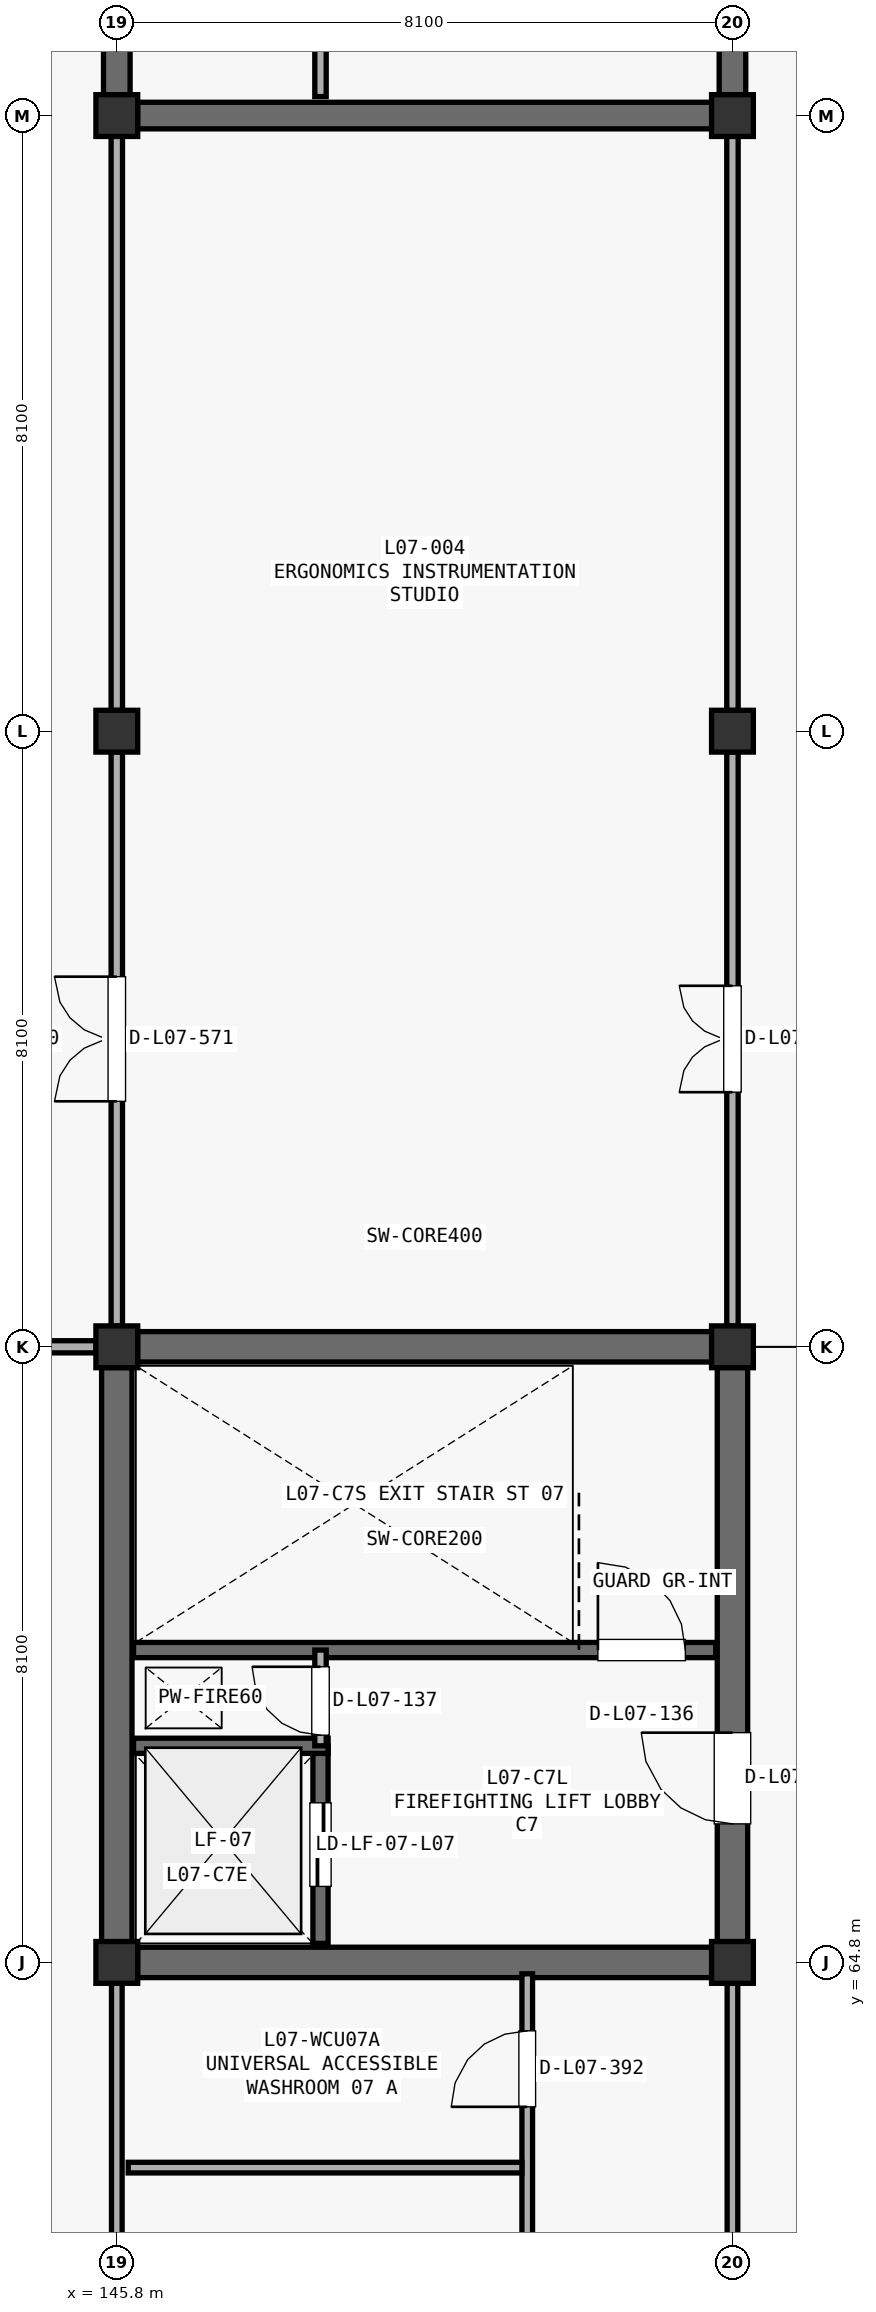
"""IFC4 building model, lengths in metres.
Left out: names, types, materials, properties, quantities, classifications, styles, units other than length and angle.
Written with IfcOpenShell. Run it as: python <this file> out.ifc"""

import sys

from ifc_helpers import new_model, si_unit, direction, frame, frame_2d, origin, origin_2d, place, context, subcontext, project, spatial, rectangle, extrude, element, fill, save


model = new_model("IFC4")
c1 = context("Model", 3, precision=1e-05, world=origin(), true_north=direction((0.0, 1.0)))
c2 = subcontext(c1, "Body", "Model", "MODEL_VIEW")
j1 = project(units=[si_unit("LENGTHUNIT", "METRE"), si_unit("PLANEANGLEUNIT", "RADIAN")], contexts=[c1])
p1 = place(None, origin())
s1 = spatial("IfcSite", under=j1, at=p1, CompositionType="ELEMENT")
p2 = place(p1, origin())
s2 = spatial("IfcBuilding", under=s1, at=p2, CompositionType="ELEMENT")
p3 = place(p2, frame((0.0, 0.0, 31.79)))
s3 = spatial("IfcBuildingStorey", under=s2, at=p3, CompositionType="ELEMENT", Elevation=31.79)
for number, where, z_axis, x_axis in (
    (1, (145.8, 64.8, 0.0), (0.0, 0.0, 1.0), (1.0, 0.0, 0.0)),
    (2, (145.8, 72.9, 0.0), (0.0, 0.0, 1.0), (1.0, 0.0, 0.0)),
    (3, (145.8, 81.0, 0.0), (0.0, 0.0, 1.0), (1.0, 0.0, 0.0)),
    (4, (145.8, 89.1, 0.0), (0.0, 0.0, 1.0), (1.0, 0.0, 0.0)),
    (5, (153.9, 64.8, 0.0), (0.0, 0.0, 1.0), (1.0, 0.0, 0.0)),
    (6, (153.9, 72.9, 0.0), (0.0, 0.0, 1.0), (1.0, 0.0, 0.0)),
    (7, (153.9, 81.0, 0.0), (0.0, 0.0, 1.0), (1.0, 0.0, 0.0)),
    (8, (153.9, 89.1, 0.0), (0.0, 0.0, 1.0), (1.0, 0.0, 0.0)),
):
    element("IfcColumn", number, at=place(p3, frame(where, z_axis=z_axis, x_axis=x_axis)), inside=s3, PredefinedType="COLUMN", context=c2, shape_type="SweptSolid", body=[
        extrude(rectangle(XDim=0.55, YDim=0.55, at=origin_2d()), origin(), (0.0, 0.0, 1.0), 4.42),
    ])
for number, where, z_axis, x_axis in (
    (9, (146.073, 72.9, 0.0), (0.0, 0.0, 1.0), (1.0, 0.0, 0.0)),
    (10, (145.8, 65.073, 0.0), (0.0, 0.0, 1.0), (0.0, 1.0, 0.0)),
):
    element("IfcWall", number, at=place(p3, frame(where, z_axis=z_axis, x_axis=x_axis)), inside=s3, PredefinedType="SHEAR", context=c2, shape_type="SweptSolid", body=[
        extrude(rectangle(XDim=7.554, YDim=0.4, at=frame_2d((3.777, 0.0))), origin(), (0.0, 0.0, 1.0), 4.162),
    ])
p4 = place(p3, frame((153.9, 65.073, 0.0), z_axis=(0.0, 0.0, 1.0), x_axis=(0.0, 1.0, 0.0)))
e11 = element("IfcWall", 11, at=p4, inside=s3, PredefinedType="SHEAR", context=c2, shape_type="SweptSolid", body=[
    extrude(rectangle(XDim=7.554, YDim=0.4, at=frame_2d((3.777, 0.0))), origin(), (0.0, 0.0, 1.0), 4.162),
])
p5 = place(p4, frame((1.55, 0.0, 0.0)))
e12 = element("IfcOpeningElement", 12, at=p5, cuts=e11, PredefinedType="OPENING", context=c2, shape_type="SweptSolid", body=[
    extrude(rectangle(XDim=1.2, YDim=2.2, at=frame_2d((0.6, 1.1))), frame((0.0, 0.21, 0.0), z_axis=(0.0, -1.0, 0.0), x_axis=(1.0, 0.0, 0.0)), (0.0, 0.0, 1.0), 0.42),
])
p6 = place(p3, frame((146.073, 64.8, 0.0), z_axis=(0.0, 0.0, 1.0), x_axis=(1.0, 0.0, 0.0)))
e13 = element("IfcWall", 13, at=p6, inside=s3, PredefinedType="SHEAR", context=c2, shape_type="SweptSolid", body=[
    extrude(rectangle(XDim=7.554, YDim=0.4, at=frame_2d((3.777, 0.0))), origin(), (0.0, 0.0, 1.0), 4.162),
])
p7 = place(p3, frame((146.02, 68.91, 0.0), z_axis=(0.0, 0.0, 1.0), x_axis=(1.0, 0.0, 0.0)))
e14 = element("IfcWall", 14, at=p7, inside=s3, PredefinedType="SHEAR", context=c2, shape_type="SweptSolid", body=[
    extrude(rectangle(XDim=7.66, YDim=0.2, at=frame_2d((3.83, 0.0))), origin(), (0.0, 0.0, 1.0), 4.162),
])
p8 = place(p7, frame((6.11, 0.0, 0.0)))
e15 = element("IfcOpeningElement", 15, at=p8, cuts=e14, PredefinedType="OPENING", context=c2, shape_type="SweptSolid", body=[
    extrude(rectangle(XDim=1.15, YDim=2.2, at=frame_2d((0.575, 1.1))), frame((0.0, 0.11, 0.0), z_axis=(0.0, -1.0, 0.0), x_axis=(1.0, 0.0, 0.0)), (0.0, 0.0, 1.0), 0.22),
])
p9 = place(p3, frame((148.48, 65.05, 0.0), z_axis=(0.0, 0.0, 1.0), x_axis=(0.0, 1.0, 0.0)))
e16 = element("IfcWall", 16, at=p9, inside=s3, PredefinedType="SHEAR", context=c2, shape_type="SweptSolid", body=[
    extrude(rectangle(XDim=2.6, YDim=0.2, at=frame_2d((1.3, 0.0))), origin(), (0.0, 0.0, 1.0), 4.162),
])
p10 = place(p9, frame((0.75, 0.0, 0.0)))
e17 = element("IfcOpeningElement", 17, at=p10, cuts=e16, PredefinedType="OPENING", context=c2, shape_type="SweptSolid", body=[
    extrude(rectangle(XDim=1.1, YDim=2.2, at=frame_2d((0.55, 1.1))), frame((0.0, 0.11, 0.0), z_axis=(0.0, -1.0, 0.0), x_axis=(1.0, 0.0, 0.0)), (0.0, 0.0, 1.0), 0.22),
])
p11 = place(p3, frame((146.02, 67.65, 0.0), z_axis=(0.0, 0.0, 1.0), x_axis=(1.0, 0.0, 0.0)))
e18 = element("IfcWall", 18, at=p11, inside=s3, PredefinedType="SHEAR", context=c2, shape_type="SweptSolid", body=[
    extrude(rectangle(XDim=2.56, YDim=0.2, at=frame_2d((1.28, 0.0))), origin(), (0.0, 0.0, 1.0), 4.162),
])
p12 = place(p3, frame((148.48, 67.65, 0.0), z_axis=(0.0, 0.0, 1.0), x_axis=(0.0, 1.0, 0.0)))
e19 = element("IfcWall", 19, at=p12, inside=s3, PredefinedType="PARTITIONING", context=c2, shape_type="SweptSolid", body=[
    extrude(rectangle(XDim=1.26, YDim=0.15, at=frame_2d((0.63, 0.0))), origin(), (0.0, 0.0, 1.0), 4.162),
])
p13 = place(p12, frame((0.14, 0.0, 0.0)))
e20 = element("IfcOpeningElement", 20, at=p13, cuts=e19, PredefinedType="OPENING", context=c2, shape_type="SweptSolid", body=[
    extrude(rectangle(XDim=0.9, YDim=2.15, at=frame_2d((0.45, 1.075))), frame((0.0, 0.085, 0.0), z_axis=(0.0, -1.0, 0.0), x_axis=(1.0, 0.0, 0.0)), (0.0, 0.0, 1.0), 0.17),
])
p14 = place(p3, frame((145.8, 89.373, 0.0), z_axis=(0.0, 0.0, 1.0), x_axis=(0.0, 1.0, 0.0)))
e21 = element("IfcWall", 21, at=p14, inside=s3, PredefinedType="SHEAR", context=c2, shape_type="SweptSolid", body=[
    extrude(rectangle(XDim=7.554, YDim=0.35, at=frame_2d((3.777, 0.0))), origin(), (0.0, 0.0, 1.0), 4.162),
])
p15 = place(p3, frame((153.9, 89.373, 0.0), z_axis=(0.0, 0.0, 1.0), x_axis=(0.0, 1.0, 0.0)))
e22 = element("IfcWall", 22, at=p15, inside=s3, PredefinedType="SHEAR", context=c2, shape_type="SweptSolid", body=[
    extrude(rectangle(XDim=7.554, YDim=0.35, at=frame_2d((3.777, 0.0))), origin(), (0.0, 0.0, 1.0), 4.162),
])
p16 = place(p15, frame((1.55, 0.0, 0.0)))
e23 = element("IfcOpeningElement", 23, at=p16, cuts=e22, PredefinedType="OPENING", context=c2, shape_type="SweptSolid", body=[
    extrude(rectangle(XDim=1.2, YDim=2.2, at=frame_2d((0.6, 1.1))), frame((0.0, 0.185, 0.0), z_axis=(0.0, -1.0, 0.0), x_axis=(1.0, 0.0, 0.0)), (0.0, 0.0, 1.0), 0.37),
])
p17 = place(p3, frame((146.073, 89.1, 0.0), z_axis=(0.0, 0.0, 1.0), x_axis=(1.0, 0.0, 0.0)))
e24 = element("IfcWall", 24, at=p17, inside=s3, PredefinedType="SHEAR", context=c2, shape_type="SweptSolid", body=[
    extrude(rectangle(XDim=7.554, YDim=0.35, at=frame_2d((3.777, 0.0))), origin(), (0.0, 0.0, 1.0), 4.162),
])
p18 = place(p3, frame((148.48, 89.35, 0.0), z_axis=(0.0, 0.0, 1.0), x_axis=(0.0, 1.0, 0.0)))
e25 = element("IfcWall", 25, at=p18, inside=s3, PredefinedType="PARTITIONING", context=c2, shape_type="SweptSolid", body=[
    extrude(rectangle(XDim=2.6, YDim=0.15, at=frame_2d((1.3, 0.0))), origin(), (0.0, 0.0, 1.0), 4.162),
])
p19 = place(p18, frame((0.8, 0.0, 0.0)))
e26 = element("IfcOpeningElement", 26, at=p19, cuts=e25, PredefinedType="OPENING", context=c2, shape_type="SweptSolid", body=[
    extrude(rectangle(XDim=0.95, YDim=2.15, at=frame_2d((0.475, 1.075))), frame((0.0, 0.085, 0.0), z_axis=(0.0, -1.0, 0.0), x_axis=(1.0, 0.0, 0.0)), (0.0, 0.0, 1.0), 0.17),
])
p20 = place(p3, frame((145.8, 56.973, 0.0), z_axis=(0.0, 0.0, 1.0), x_axis=(0.0, 1.0, 0.0)))
e27 = element("IfcWall", 27, at=p20, inside=s3, PredefinedType="PARTITIONING", context=c2, shape_type="SweptSolid", body=[
    extrude(rectangle(XDim=7.554, YDim=0.14, at=frame_2d((3.777, 0.0))), origin(), (0.0, 0.0, 1.0), 3.51),
])
p21 = place(p3, frame((153.9, 56.973, 0.0), z_axis=(0.0, 0.0, 1.0), x_axis=(0.0, 1.0, 0.0)))
e28 = element("IfcWall", 28, at=p21, inside=s3, PredefinedType="PARTITIONING", context=c2, shape_type="SweptSolid", body=[
    extrude(rectangle(XDim=7.554, YDim=0.14, at=frame_2d((3.777, 0.0))), origin(), (0.0, 0.0, 1.0), 3.31),
])
p22 = place(p21, frame((3.317, 0.0, 0.0)))
e29 = element("IfcOpeningElement", 29, at=p22, cuts=e28, PredefinedType="OPENING", context=c2, shape_type="SweptSolid", body=[
    extrude(rectangle(XDim=0.92, YDim=2.15, at=frame_2d((0.46, 1.075))), frame((0.0, 0.08, 0.0), z_axis=(0.0, -1.0, 0.0), x_axis=(1.0, 0.0, 0.0)), (0.0, 0.0, 1.0), 0.16),
])
p23 = place(p3, frame((151.2, 56.85, 0.0), z_axis=(0.0, 0.0, 1.0), x_axis=(0.0, 1.0, 0.0)))
e30 = element("IfcWall", 30, at=p23, inside=s3, PredefinedType="PARTITIONING", context=c2, shape_type="SweptSolid", body=[
    extrude(rectangle(XDim=7.8, YDim=0.14, at=frame_2d((3.9, 0.0))), origin(), (0.0, 0.0, 1.0), 4.162),
])
p24 = place(p23, frame((0.75, 0.0, 0.0)))
e31 = element("IfcOpeningElement", 31, at=p24, cuts=e30, PredefinedType="OPENING", context=c2, shape_type="SweptSolid", body=[
    extrude(rectangle(XDim=0.92, YDim=2.15, at=frame_2d((0.46, 1.075))), frame((0.0, 0.08, 0.0), z_axis=(0.0, -1.0, 0.0), x_axis=(1.0, 0.0, 0.0)), (0.0, 0.0, 1.0), 0.16),
])
p25 = place(p23, frame((3.44, 0.0, 0.0)))
e32 = element("IfcOpeningElement", 32, at=p25, cuts=e30, PredefinedType="OPENING", context=c2, shape_type="SweptSolid", body=[
    extrude(rectangle(XDim=0.92, YDim=2.15, at=frame_2d((0.46, 1.075))), frame((0.0, 0.08, 0.0), z_axis=(0.0, -1.0, 0.0), x_axis=(1.0, 0.0, 0.0)), (0.0, 0.0, 1.0), 0.16),
])
p26 = place(p23, frame((6.05, 0.0, 0.0)))
e33 = element("IfcOpeningElement", 33, at=p26, cuts=e30, PredefinedType="OPENING", context=c2, shape_type="SweptSolid", body=[
    extrude(rectangle(XDim=1.0, YDim=2.15, at=frame_2d((0.5, 1.075))), frame((0.0, 0.08, 0.0), z_axis=(0.0, -1.0, 0.0), x_axis=(1.0, 0.0, 0.0)), (0.0, 0.0, 1.0), 0.16),
])
p27 = place(p3, frame((145.95, 62.1, 0.0), z_axis=(0.0, 0.0, 1.0), x_axis=(1.0, 0.0, 0.0)))
e34 = element("IfcWall", 34, at=p27, inside=s3, PredefinedType="PARTITIONING", context=c2, shape_type="SweptSolid", body=[
    extrude(rectangle(XDim=5.18, YDim=0.14, at=frame_2d((2.59, 0.0))), origin(), (0.0, 0.0, 1.0), 4.162),
])
p28 = place(p3, frame((137.973, 72.9, 0.0), z_axis=(0.0, 0.0, 1.0), x_axis=(1.0, 0.0, 0.0)))
e35 = element("IfcWall", 35, at=p28, inside=s3, PredefinedType="PARTITIONING", context=c2, shape_type="SweptSolid", body=[
    extrude(rectangle(XDim=7.554, YDim=0.16, at=frame_2d((3.777, 0.0))), origin(), (0.0, 0.0, 1.0), 3.212),
])
p29 = place(p3, frame((145.8, 73.173, 0.0), z_axis=(0.0, 0.0, 1.0), x_axis=(0.0, 1.0, 0.0)))
e36 = element("IfcWall", 36, at=p29, inside=s3, PredefinedType="PARTITIONING", context=c2, shape_type="SweptSolid", body=[
    extrude(rectangle(XDim=7.554, YDim=0.15, at=frame_2d((3.777, 0.0))), origin(), (0.0, 0.0, 1.0), 3.312),
])
p30 = place(p29, frame((2.957, 0.0, 0.0)))
e37 = element("IfcOpeningElement", 37, at=p30, cuts=e36, PredefinedType="OPENING", context=c2, shape_type="SweptSolid", body=[
    extrude(rectangle(XDim=1.64, YDim=2.25, at=frame_2d((0.82, 1.125))), frame((0.0, 0.085, 0.0), z_axis=(0.0, -1.0, 0.0), x_axis=(1.0, 0.0, 0.0)), (0.0, 0.0, 1.0), 0.17),
])
p31 = place(p3, frame((145.8, 81.273, 0.0), z_axis=(0.0, 0.0, 1.0), x_axis=(0.0, 1.0, 0.0)))
e38 = element("IfcWall", 38, at=p31, inside=s3, PredefinedType="PARTITIONING", context=c2, shape_type="SweptSolid", body=[
    extrude(rectangle(XDim=7.554, YDim=0.15, at=frame_2d((3.777, 0.0))), origin(), (0.0, 0.0, 1.0), 3.212),
])
p32 = place(p3, frame((153.9, 73.173, 0.0), z_axis=(0.0, 0.0, 1.0), x_axis=(0.0, 1.0, 0.0)))
e39 = element("IfcWall", 39, at=p32, inside=s3, PredefinedType="PARTITIONING", context=c2, shape_type="SweptSolid", body=[
    extrude(rectangle(XDim=7.554, YDim=0.15, at=frame_2d((3.777, 0.0))), origin(), (0.0, 0.0, 1.0), 3.412),
])
p33 = place(p32, frame((3.077, 0.0, 0.0)))
e40 = element("IfcOpeningElement", 40, at=p33, cuts=e39, PredefinedType="OPENING", context=c2, shape_type="SweptSolid", body=[
    extrude(rectangle(XDim=1.4, YDim=2.2, at=frame_2d((0.7, 1.1))), frame((0.0, 0.085, 0.0), z_axis=(0.0, -1.0, 0.0), x_axis=(1.0, 0.0, 0.0)), (0.0, 0.0, 1.0), 0.17),
])
p34 = place(p3, frame((153.9, 81.273, 0.0), z_axis=(0.0, 0.0, 1.0), x_axis=(0.0, 1.0, 0.0)))
e41 = element("IfcWall", 41, at=p34, inside=s3, PredefinedType="PARTITIONING", context=c2, shape_type="SweptSolid", body=[
    extrude(rectangle(XDim=7.554, YDim=0.15, at=frame_2d((3.777, 0.0))), origin(), (0.0, 0.0, 1.0), 3.512),
])
p35 = place(p5, origin())
e42 = element("IfcDoor", 42, at=p35, inside=s3, OperationType="SINGLE_SWING_RIGHT", PredefinedType="DOOR", context=c2, shape_type="SweptSolid", body=[
    extrude(rectangle(XDim=1.2, YDim=2.2, at=frame_2d((0.6, 1.1))), frame((0.0, 0.025, 0.0), z_axis=(0.0, -1.0, 0.0), x_axis=(1.0, 0.0, 0.0)), (0.0, 0.0, 1.0), 0.05),
])
fill(e12, e42)
p36 = place(p8, origin())
e43 = element("IfcDoor", 43, at=p36, inside=s3, OperationType="SINGLE_SWING_LEFT", PredefinedType="DOOR", context=c2, shape_type="SweptSolid", body=[
    extrude(rectangle(XDim=1.15, YDim=2.2, at=frame_2d((0.575, 1.1))), frame((0.0, 0.025, 0.0), z_axis=(0.0, -1.0, 0.0), x_axis=(1.0, 0.0, 0.0)), (0.0, 0.0, 1.0), 0.05),
])
fill(e15, e43)
p37 = place(p10, origin())
e44 = element("IfcDoor", 44, at=p37, inside=s3, OperationType="SLIDING_TO_LEFT", PredefinedType="DOOR", context=c2, shape_type="SweptSolid", body=[
    extrude(rectangle(XDim=1.1, YDim=2.2, at=frame_2d((0.55, 1.1))), frame((0.0, 0.025, 0.0), z_axis=(0.0, -1.0, 0.0), x_axis=(1.0, 0.0, 0.0)), (0.0, 0.0, 1.0), 0.05),
])
fill(e17, e44)
p38 = place(p13, origin())
e45 = element("IfcDoor", 45, at=p38, inside=s3, OperationType="SINGLE_SWING_RIGHT", PredefinedType="DOOR", context=c2, shape_type="SweptSolid", body=[
    extrude(rectangle(XDim=0.9, YDim=2.15, at=frame_2d((0.45, 1.075))), frame((0.0, 0.025, 0.0), z_axis=(0.0, -1.0, 0.0), x_axis=(1.0, 0.0, 0.0)), (0.0, 0.0, 1.0), 0.05),
])
fill(e20, e45)
p39 = place(p26, origin())
e46 = element("IfcDoor", 46, at=p39, inside=s3, OperationType="SINGLE_SWING_LEFT", PredefinedType="DOOR", context=c2, shape_type="SweptSolid", body=[
    extrude(rectangle(XDim=1.0, YDim=2.15, at=frame_2d((0.5, 1.075))), frame((0.0, 0.025, 0.0), z_axis=(0.0, -1.0, 0.0), x_axis=(1.0, 0.0, 0.0)), (0.0, 0.0, 1.0), 0.05),
])
fill(e33, e46)
p40 = place(p30, origin())
e47 = element("IfcDoor", 47, at=p40, inside=s3, OperationType="DOUBLE_SWING_LEFT", PredefinedType="DOOR", context=c2, shape_type="SweptSolid", body=[
    extrude(rectangle(XDim=1.64, YDim=2.25, at=frame_2d((0.82, 1.125))), frame((0.0, 0.025, 0.0), z_axis=(0.0, -1.0, 0.0), x_axis=(1.0, 0.0, 0.0)), (0.0, 0.0, 1.0), 0.05),
])
fill(e37, e47)
p41 = place(p33, origin())
e48 = element("IfcDoor", 48, at=p41, inside=s3, OperationType="DOUBLE_SWING_LEFT", PredefinedType="DOOR", context=c2, shape_type="SweptSolid", body=[
    extrude(rectangle(XDim=1.4, YDim=2.2, at=frame_2d((0.7, 1.1))), frame((0.0, 0.025, 0.0), z_axis=(0.0, -1.0, 0.0), x_axis=(1.0, 0.0, 0.0)), (0.0, 0.0, 1.0), 0.05),
])
fill(e40, e48)
save(model, sys.argv[1])
